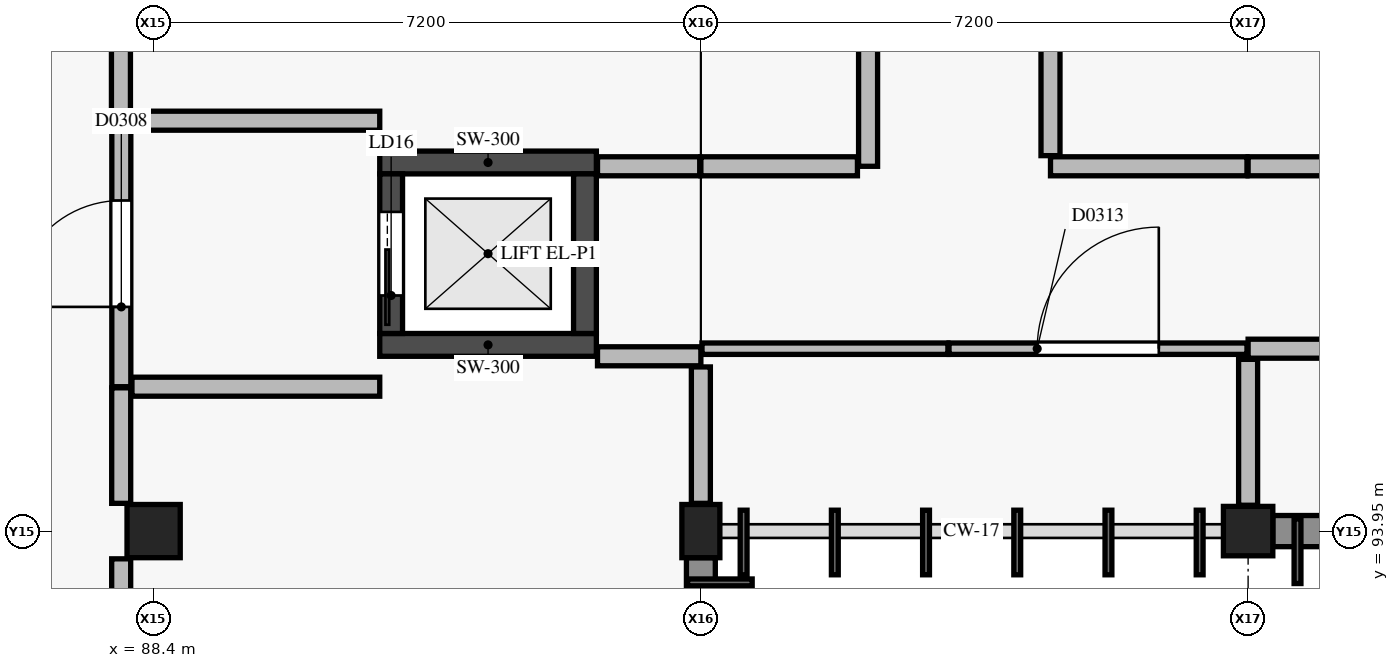
"""IFC4 building model, lengths in metres.
Left out: names, types, materials, properties, quantities, classifications, styles, units other than length and angle.
Written with IfcOpenShell. Run it as: python <this file> out.ifc"""

import sys

from ifc_helpers import new_model, si_unit, direction, frame, frame_2d, origin, origin_2d, place, context, subcontext, project, spatial, rectangle, extrude, element, fill, save


model = new_model("IFC4")
c1 = context("Model", 3, precision=1e-05, world=origin(), true_north=direction((0.0, 1.0)))
c2 = subcontext(c1, "Body", "Model", "MODEL_VIEW")
j1 = project(units=[si_unit("LENGTHUNIT", "METRE"), si_unit("PLANEANGLEUNIT", "RADIAN")], contexts=[c1])
p1 = place(None, origin())
s1 = spatial("IfcSite", under=j1, at=p1, CompositionType="ELEMENT")
p2 = place(p1, origin())
s2 = spatial("IfcBuilding", under=s1, at=p2, CompositionType="ELEMENT")
p3 = place(p2, frame((0.0, 0.0, 21.6)))
s3 = spatial("IfcBuildingStorey", under=s2, at=p3, CompositionType="ELEMENT", Elevation=21.6)
p4 = place(p3, frame((88.4, 93.95, 0.0), z_axis=(0.0, 0.0, 1.0), x_axis=(1.0, 0.0, 0.0)))
e1 = element("IfcColumn", 1, at=p4, inside=s3, PredefinedType="COLUMN", context=c2, shape_type="SweptSolid", body=[
    extrude(rectangle(XDim=0.7, YDim=0.7, at=origin_2d()), origin(), (0.0, 0.0, 1.0), 4.36),
])
p5 = place(p3, frame((95.6, 93.95, 0.0), z_axis=(0.0, 0.0, 1.0), x_axis=(1.0, 0.0, 0.0)))
e2 = element("IfcColumn", 2, at=p5, inside=s3, PredefinedType="COLUMN", context=c2, shape_type="SweptSolid", body=[
    extrude(rectangle(XDim=0.5, YDim=0.7, at=origin_2d()), origin(), (0.0, 0.0, 1.0), 4.36),
])
p6 = place(p3, frame((102.8, 93.95, 0.0), z_axis=(0.0, 0.0, 1.0), x_axis=(1.0, 0.0, 0.0)))
e3 = element("IfcColumn", 3, at=p6, inside=s3, PredefinedType="COLUMN", context=c2, shape_type="SweptSolid", body=[
    extrude(rectangle(XDim=0.65, YDim=0.65, at=origin_2d()), origin(), (0.0, 0.0, 1.0), 4.36),
])
for number, where, z_axis, x_axis in (
    (4, (91.375, 96.4, 0.0), (0.0, 0.0, 1.0), (1.0, 0.0, 0.0)),
    (5, (91.375, 98.8, 0.0), (0.0, 0.0, 1.0), (1.0, 0.0, 0.0)),
):
    element("IfcWall", number, at=place(p3, frame(where, z_axis=z_axis, x_axis=x_axis)), inside=s3, PredefinedType="SHEAR", context=c2, shape_type="SweptSolid", body=[
        extrude(rectangle(XDim=2.85, YDim=0.3, at=frame_2d((1.425, 0.0))), origin(), (0.0, 0.0, 1.0), 3.95),
    ])
p7 = place(p3, frame((91.525, 96.55, 0.0), z_axis=(0.0, 0.0, 1.0), x_axis=(0.0, 1.0, 0.0)))
e6 = element("IfcWall", 6, at=p7, inside=s3, PredefinedType="SHEAR", context=c2, shape_type="SweptSolid", body=[
    extrude(rectangle(XDim=2.1, YDim=0.3, at=frame_2d((1.05, 0.0))), origin(), (0.0, 0.0, 1.0), 3.95),
])
p8 = place(p7, frame((0.5, 0.0, 0.0)))
e7 = element("IfcOpeningElement", 7, at=p8, cuts=e6, PredefinedType="OPENING", context=c2, shape_type="SweptSolid", body=[
    extrude(rectangle(XDim=1.1, YDim=2.15, at=frame_2d((0.55, 1.075))), frame((0.0, 0.16, 0.0), z_axis=(0.0, -1.0, 0.0), x_axis=(1.0, 0.0, 0.0)), (0.0, 0.0, 1.0), 0.32),
])
p9 = place(p3, frame((94.075, 96.55, 0.0), z_axis=(0.0, 0.0, 1.0), x_axis=(0.0, 1.0, 0.0)))
e8 = element("IfcWall", 8, at=p9, inside=s3, PredefinedType="SHEAR", context=c2, shape_type="SweptSolid", body=[
    extrude(rectangle(XDim=2.1, YDim=0.3, at=frame_2d((1.05, 0.0))), origin(), (0.0, 0.0, 1.0), 3.95),
])
p10 = place(p3, frame((109.775, 93.95, 0.0), z_axis=(0.0, 0.0, 1.0), x_axis=(-1.0, 0.0, 0.0)))
e9 = element("IfcWall", 9, at=p10, inside=s3, PredefinedType="USERDEFINED", context=c2, shape_type="SweptSolid", body=[
    extrude(rectangle(XDim=6.65, YDim=0.41, at=frame_2d((3.325, 0.0))), origin(), (0.0, 0.0, 1.0), 3.37),
])
p11 = place(p10, frame((2.725, 0.0, 0.6)))
e10 = element("IfcOpeningElement", 10, at=p11, cuts=e9, PredefinedType="OPENING", context=c2, shape_type="SweptSolid", body=[
    extrude(rectangle(XDim=1.2, YDim=2.2, at=frame_2d((0.6, 1.1))), frame((0.0, 0.215, 0.0), z_axis=(0.0, -1.0, 0.0), x_axis=(1.0, 0.0, 0.0)), (0.0, 0.0, 1.0), 0.43),
])
p12 = place(p3, frame((95.6, 93.6, 0.0), z_axis=(0.0, 0.0, 1.0), x_axis=(0.0, -1.0, 0.0)))
e11 = element("IfcWall", 11, at=p12, inside=s3, PredefinedType="USERDEFINED", context=c2, shape_type="SweptSolid", body=[
    extrude(rectangle(XDim=6.65, YDim=0.38, at=frame_2d((3.325, 0.0))), origin(), (0.0, 0.0, 1.0), 3.38),
])
p13 = place(p12, frame((2.525, 0.0, 0.6)))
e12 = element("IfcOpeningElement", 12, at=p13, cuts=e11, PredefinedType="OPENING", context=c2, shape_type="SweptSolid", body=[
    extrude(rectangle(XDim=1.6, YDim=2.2, at=frame_2d((0.8, 1.1))), frame((0.0, 0.2, 0.0), z_axis=(0.0, -1.0, 0.0), x_axis=(1.0, 0.0, 0.0)), (0.0, 0.0, 1.0), 0.4),
])
p14 = place(p3, frame((87.975, 95.85, 0.0), z_axis=(0.0, 0.0, 1.0), x_axis=(0.0, 1.0, 0.0)))
e13 = element("IfcWall", 13, at=p14, inside=s3, PredefinedType="PARTITIONING", context=c2, shape_type="SweptSolid", body=[
    extrude(rectangle(XDim=3.5, YDim=0.25, at=frame_2d((1.75, 0.0))), origin(), (0.0, 0.0, 1.0), 3.95),
])
p15 = place(p14, frame((1.05, 0.0, 0.0)))
e14 = element("IfcOpeningElement", 14, at=p15, cuts=e13, PredefinedType="OPENING", context=c2, shape_type="SweptSolid", body=[
    extrude(rectangle(XDim=1.4, YDim=2.2, at=frame_2d((0.7, 1.1))), frame((0.0, 0.135, 0.0), z_axis=(0.0, -1.0, 0.0), x_axis=(1.0, 0.0, 0.0)), (0.0, 0.0, 1.0), 0.27),
])
for number, where, z_axis, x_axis in (
    (15, (88.115, 99.35, 0.0), (0.0, 0.0, 1.0), (1.0, 0.0, 0.0)),
    (16, (88.115, 95.85, 0.0), (0.0, 0.0, 1.0), (1.0, 0.0, 0.0)),
):
    element("IfcWall", number, at=place(p3, frame(where, z_axis=z_axis, x_axis=x_axis)), inside=s3, PredefinedType="PARTITIONING", context=c2, shape_type="SweptSolid", body=[
        extrude(rectangle(XDim=3.26, YDim=0.25, at=frame_2d((1.63, 0.0))), origin(), (0.0, 0.0, 1.0), 3.44),
    ])
p16 = place(p3, frame((87.972, 87.14, 0.0), z_axis=(0.0, 0.0, 1.0), x_axis=(0.000189408285, 0.999999982062, 0.0)))
e17 = element("IfcWall", 17, at=p16, inside=s3, PredefinedType="PARTITIONING", context=c2, shape_type="SweptSolid", body=[
    extrude(rectangle(XDim=6.445, YDim=0.25, at=frame_2d((3.222, 0.0))), origin(), (0.0, 0.0, 1.0), 3.95),
])
p17 = place(p3, frame((87.973, 94.315, 0.0), z_axis=(0.0, 0.0, 1.0), x_axis=(0.000160642568, 0.999999987097, 0.0)))
e18 = element("IfcWall", 18, at=p17, inside=s3, PredefinedType="PARTITIONING", context=c2, shape_type="SweptSolid", body=[
    extrude(rectangle(XDim=1.52, YDim=0.25, at=frame_2d((0.76, 0.0))), origin(), (0.0, 0.0, 1.0), 3.95),
])
p18 = place(p3, frame((87.97, 99.365, 0.0), z_axis=(0.0, 0.0, 1.0), x_axis=(0.0, 1.0, 0.0)))
e19 = element("IfcWall", 19, at=p18, inside=s3, PredefinedType="PARTITIONING", context=c2, shape_type="SweptSolid", body=[
    extrude(rectangle(XDim=1.135, YDim=0.25, at=frame_2d((0.567, 0.0))), origin(), (0.0, 0.0, 1.0), 3.95),
])
p19 = place(p3, frame((97.8, 98.75, 0.0), z_axis=(0.0, 0.0, 1.0), x_axis=(0.0, 1.0, 0.0)))
e20 = element("IfcWall", 20, at=p19, inside=s3, PredefinedType="PARTITIONING", context=c2, shape_type="SweptSolid", body=[
    extrude(rectangle(XDim=2.76, YDim=0.25, at=frame_2d((1.38, 0.0))), origin(), (0.0, 0.0, 1.0), 3.44),
])
p20 = place(p3, frame((95.6, 98.75, 0.0), z_axis=(0.0, 0.0, 1.0), x_axis=(1.0, 0.0, 0.0)))
e21 = element("IfcWall", 21, at=p20, inside=s3, PredefinedType="PARTITIONING", context=c2, shape_type="SweptSolid", body=[
    extrude(rectangle(XDim=2.06, YDim=0.25, at=frame_2d((1.03, 0.0))), origin(), (0.0, 0.0, 1.0), 3.22),
])
p21 = place(p3, frame((94.24, 98.75, 0.0), z_axis=(0.0, 0.0, 1.0), x_axis=(1.0, 0.0, 0.0)))
e22 = element("IfcWall", 22, at=p21, inside=s3, PredefinedType="PARTITIONING", context=c2, shape_type="SweptSolid", body=[
    extrude(rectangle(XDim=1.345, YDim=0.25, at=frame_2d((0.672, 0.0))), origin(), (0.0, 0.0, 1.0), 3.22),
])
p22 = place(p3, frame((94.24, 96.25, 0.0), z_axis=(0.0, 0.0, 1.0), x_axis=(1.0, 0.0, 0.0)))
e23 = element("IfcWall", 23, at=p22, inside=s3, PredefinedType="PARTITIONING", context=c2, shape_type="SweptSolid", body=[
    extrude(rectangle(XDim=1.36, YDim=0.25, at=frame_2d((0.68, 0.0))), origin(), (0.0, 0.0, 1.0), 3.22),
])
p23 = place(p3, frame((102.8, 96.35, 0.0), z_axis=(0.0, 0.0, 1.0), x_axis=(1.0, 0.0, 0.0)))
e24 = element("IfcWall", 24, at=p23, inside=s3, PredefinedType="PARTITIONING", context=c2, shape_type="SweptSolid", body=[
    extrude(rectangle(XDim=5.7, YDim=0.25, at=frame_2d((2.85, 0.0))), origin(), (0.0, 0.0, 1.0), 3.32),
])
p24 = place(p23, frame((1.85, 0.0, 0.0)))
e25 = element("IfcOpeningElement", 25, at=p24, cuts=e24, PredefinedType="OPENING", context=c2, shape_type="SweptSolid", body=[
    extrude(rectangle(XDim=2.0, YDim=2.4, at=frame_2d((1.0, 1.2))), frame((0.0, 0.135, 0.0), z_axis=(0.0, -1.0, 0.0), x_axis=(1.0, 0.0, 0.0)), (0.0, 0.0, 1.0), 0.27),
])
p25 = place(p3, frame((102.8, 98.75, 0.0), z_axis=(0.0, 0.0, 1.0), x_axis=(1.0, 0.0, 0.0)))
e26 = element("IfcWall", 26, at=p25, inside=s3, PredefinedType="PARTITIONING", context=c2, shape_type="SweptSolid", body=[
    extrude(rectangle(XDim=4.035, YDim=0.25, at=frame_2d((2.018, 0.0))), origin(), (0.0, 0.0, 1.0), 3.32),
])
p26 = place(p3, frame((100.2, 98.75, 0.0), z_axis=(0.0, 0.0, 1.0), x_axis=(1.0, 0.0, 0.0)))
e27 = element("IfcWall", 27, at=p26, inside=s3, PredefinedType="PARTITIONING", context=c2, shape_type="SweptSolid", body=[
    extrude(rectangle(XDim=2.585, YDim=0.25, at=frame_2d((1.292, 0.0))), origin(), (0.0, 0.0, 1.0), 3.32),
])
p27 = place(p3, frame((100.2, 98.89, 0.0), z_axis=(0.0, 0.0, 1.0), x_axis=(0.0, 1.0, 0.0)))
e28 = element("IfcWall", 28, at=p27, inside=s3, PredefinedType="PARTITIONING", context=c2, shape_type="SweptSolid", body=[
    extrude(rectangle(XDim=2.76, YDim=0.25, at=frame_2d((1.38, 0.0))), origin(), (0.0, 0.0, 1.0), 3.44),
])
p28 = place(p3, frame((95.615, 96.35, 0.0), z_axis=(0.0, 0.0, 1.0), x_axis=(1.0, 0.0, 0.0)))
e29 = element("IfcWall", 29, at=p28, inside=s3, PredefinedType="PARTITIONING", context=c2, shape_type="SweptSolid", body=[
    extrude(rectangle(XDim=3.235, YDim=0.15, at=frame_2d((1.618, 0.0))), origin(), (0.0, 0.0, 1.0), 3.22),
])
p29 = place(p3, frame((98.865, 96.35, 0.0), z_axis=(0.0, 0.0, 1.0), x_axis=(1.0, 0.0, 0.0)))
e30 = element("IfcWall", 30, at=p29, inside=s3, PredefinedType="PARTITIONING", context=c2, shape_type="SweptSolid", body=[
    extrude(rectangle(XDim=3.92, YDim=0.15, at=frame_2d((1.96, 0.0))), origin(), (0.0, 0.0, 1.0), 3.32),
])
p30 = place(p29, frame((1.16, 0.0, 0.0)))
e31 = element("IfcOpeningElement", 31, at=p30, cuts=e30, PredefinedType="OPENING", context=c2, shape_type="SweptSolid", body=[
    extrude(rectangle(XDim=1.6, YDim=2.25, at=frame_2d((0.8, 1.125))), frame((0.0, 0.085, 0.0), z_axis=(0.0, -1.0, 0.0), x_axis=(1.0, 0.0, 0.0)), (0.0, 0.0, 1.0), 0.17),
])
p31 = place(p3, frame((95.6, 94.315, 0.0), z_axis=(0.0, 0.0, 1.0), x_axis=(0.0, 1.0, 0.0)))
e32 = element("IfcWall", 32, at=p31, inside=s3, PredefinedType="PARTITIONING", context=c2, shape_type="SweptSolid", body=[
    extrude(rectangle(XDim=1.795, YDim=0.25, at=frame_2d((0.897, 0.0))), origin(), (0.0, 0.0, 1.0), 3.22),
])
p32 = place(p3, frame((102.8, 94.29, 0.0), z_axis=(0.0, 0.0, 1.0), x_axis=(0.0, 1.0, 0.0)))
e33 = element("IfcWall", 33, at=p32, inside=s3, PredefinedType="PARTITIONING", context=c2, shape_type="SweptSolid", body=[
    extrude(rectangle(XDim=1.92, YDim=0.25, at=frame_2d((0.96, 0.0))), origin(), (0.0, 0.0, 1.0), 3.32),
])
p33 = place(p8, origin())
e34 = element("IfcDoor", 34, at=p33, inside=s3, OperationType="SLIDING_TO_LEFT", PredefinedType="DOOR", context=c2, shape_type="SweptSolid", body=[
    extrude(rectangle(XDim=1.1, YDim=2.15, at=frame_2d((0.55, 1.075))), frame((0.0, 0.025, 0.0), z_axis=(0.0, -1.0, 0.0), x_axis=(1.0, 0.0, 0.0)), (0.0, 0.0, 1.0), 0.05),
])
fill(e7, e34)
p34 = place(p15, origin())
e35 = element("IfcDoor", 35, at=p34, inside=s3, OperationType="SINGLE_SWING_LEFT", PredefinedType="DOOR", context=c2, shape_type="SweptSolid", body=[
    extrude(rectangle(XDim=1.4, YDim=2.2, at=frame_2d((0.7, 1.1))), frame((0.0, 0.025, 0.0), z_axis=(0.0, -1.0, 0.0), x_axis=(1.0, 0.0, 0.0)), (0.0, 0.0, 1.0), 0.05),
])
fill(e14, e35)
p35 = place(p30, origin())
e36 = element("IfcDoor", 36, at=p35, inside=s3, OperationType="SINGLE_SWING_RIGHT", PredefinedType="DOOR", context=c2, shape_type="SweptSolid", body=[
    extrude(rectangle(XDim=1.6, YDim=2.25, at=frame_2d((0.8, 1.125))), frame((0.0, 0.025, 0.0), z_axis=(0.0, -1.0, 0.0), x_axis=(1.0, 0.0, 0.0)), (0.0, 0.0, 1.0), 0.05),
])
fill(e31, e36)
save(model, sys.argv[1])
